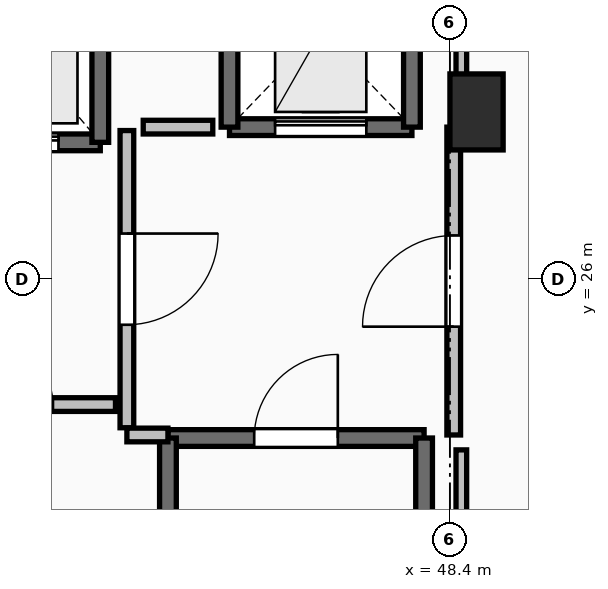
"""IFC4 building model, lengths in metres.
Left out: names, types, materials, properties, quantities, classifications, styles, units other than length and angle.
Written with IfcOpenShell. Run it as: python <this file> out.ifc"""

import sys

from ifc_helpers import new_model, si_unit, direction, frame, frame_2d, origin, origin_2d, place, context, subcontext, project, spatial, rectangle, extrude, element, fill, save


model = new_model("IFC4")
c1 = context("Model", 3, precision=1e-05, world=origin(), true_north=direction((0.0, 1.0)))
c2 = subcontext(c1, "Body", "Model", "MODEL_VIEW")
j1 = project(units=[si_unit("LENGTHUNIT", "METRE"), si_unit("PLANEANGLEUNIT", "RADIAN")], contexts=[c1])
p1 = place(None, origin())
s1 = spatial("IfcSite", under=j1, at=p1, CompositionType="ELEMENT")
p2 = place(p1, origin())
s2 = spatial("IfcBuilding", under=s1, at=p2, CompositionType="ELEMENT")
p3 = place(p2, frame((0.0, 0.0, 234.25)))
s3 = spatial("IfcBuildingStorey", under=s2, at=p3, CompositionType="ELEMENT", Elevation=234.25)
p4 = place(p3, frame((48.75, 28.2, 0.0), z_axis=(0.0, 0.0, 1.0), x_axis=(1.0, 0.0, 0.0)))
e1 = element("IfcColumn", 1, at=p4, inside=s3, PredefinedType="PILASTER", context=c2, shape_type="SweptSolid", body=[
    extrude(rectangle(XDim=0.7, YDim=1.0, at=origin_2d()), origin(), (0.0, 0.0, 1.0), 3.55),
])
p5 = place(p3, frame((44.69, 23.91, 0.0), z_axis=(0.0, 0.0, 1.0), x_axis=(1.0, 0.0, 0.0)))
e2 = element("IfcWall", 2, at=p5, inside=s3, PredefinedType="SOLIDWALL", context=c2, shape_type="SweptSolid", body=[
    extrude(rectangle(XDim=3.37, YDim=0.22, at=frame_2d((1.685, 0.0))), origin(), (0.0, 0.0, 1.0), 3.29),
])
p6 = place(p5, frame((1.135, 0.0, 0.0)))
e3 = element("IfcOpeningElement", 3, at=p6, cuts=e2, PredefinedType="OPENING", context=c2, shape_type="SweptSolid", body=[
    extrude(rectangle(XDim=1.1, YDim=2.15, at=frame_2d((0.55, 1.075))), frame((0.0, 0.125, 0.0), z_axis=(0.0, -1.0, 0.0), x_axis=(1.0, 0.0, 0.0)), (0.0, 0.0, 1.0), 0.25),
])
for number, where, z_axis, x_axis in (
    (4, (48.06, 23.91, 0.0), (0.0, 0.0, 1.0), (0.0, -1.0, 0.0)),
    (5, (44.69, 16.49, 0.0), (0.0, 0.0, 1.0), (0.0, 1.0, 0.0)),
):
    element("IfcWall", number, at=place(p3, frame(where, z_axis=z_axis, x_axis=x_axis)), inside=s3, PredefinedType="SOLIDWALL", context=c2, shape_type="SweptSolid", body=[
        extrude(rectangle(XDim=7.42, YDim=0.22, at=frame_2d((3.71, 0.0))), origin(), (0.0, 0.0, 1.0), 3.29),
    ])
p7 = place(p3, frame((41.6, 27.8, 0.0), z_axis=(0.0, 0.0, 1.0), x_axis=(1.0, 0.0, 0.0)))
e6 = element("IfcWall", 6, at=p7, inside=s3, PredefinedType="SOLIDWALL", context=c2, shape_type="SweptSolid", body=[
    extrude(rectangle(XDim=2.2, YDim=0.22, at=frame_2d((1.1, 0.0))), origin(), (0.0, 0.0, 1.0), 3.29),
])
p8 = place(p7, frame((0.55, 0.0, 0.0)))
e7 = element("IfcOpeningElement", 7, at=p8, cuts=e6, PredefinedType="OPENING", context=c2, shape_type="SweptSolid", body=[
    extrude(rectangle(XDim=1.1, YDim=2.2, at=frame_2d((0.55, 1.1))), frame((0.0, 0.125, 0.0), z_axis=(0.0, -1.0, 0.0), x_axis=(1.0, 0.0, 0.0)), (0.0, 0.0, 1.0), 0.25),
])
p9 = place(p3, frame((43.8, 27.8, 0.0), z_axis=(0.0, 0.0, 1.0), x_axis=(0.0, 1.0, 0.0)))
e8 = element("IfcWall", 8, at=p9, inside=s3, PredefinedType="SOLIDWALL", context=c2, shape_type="SweptSolid", body=[
    extrude(rectangle(XDim=2.6, YDim=0.22, at=frame_2d((1.3, 0.0))), origin(), (0.0, 0.0, 1.0), 3.29),
])
p10 = place(p3, frame((45.5, 28.0, 0.0), z_axis=(0.0, 0.0, 1.0), x_axis=(1.0, 0.0, 0.0)))
e9 = element("IfcWall", 9, at=p10, inside=s3, PredefinedType="SHEAR", context=c2, shape_type="SweptSolid", body=[
    extrude(rectangle(XDim=2.4, YDim=0.22, at=frame_2d((1.2, 0.0))), origin(), (0.0, 0.0, 1.0), 3.29),
])
p11 = place(p10, frame((0.6, 0.0, 0.0)))
e10 = element("IfcOpeningElement", 10, at=p11, cuts=e9, PredefinedType="OPENING", context=c2, shape_type="SweptSolid", body=[
    extrude(rectangle(XDim=1.2, YDim=2.2, at=frame_2d((0.6, 1.1))), frame((0.0, 0.125, 0.0), z_axis=(0.0, -1.0, 0.0), x_axis=(1.0, 0.0, 0.0)), (0.0, 0.0, 1.0), 0.25),
])
for number, where, z_axis, x_axis in (
    (11, (47.9, 28.0, 0.0), (0.0, 0.0, 1.0), (0.0, 1.0, 0.0)),
    (12, (45.5, 30.5, 0.0), (0.0, 0.0, 1.0), (0.0, -1.0, 0.0)),
):
    element("IfcWall", number, at=place(p3, frame(where, z_axis=z_axis, x_axis=x_axis)), inside=s3, PredefinedType="SHEAR", context=c2, shape_type="SweptSolid", body=[
        extrude(rectangle(XDim=2.5, YDim=0.22, at=frame_2d((1.25, 0.0))), origin(), (0.0, 0.0, 1.0), 3.29),
    ])
p12 = place(p3, frame((44.15, 27.955, 0.0), z_axis=(0.0, 0.0, 1.0), x_axis=(0.0, -1.0, 0.0)))
e13 = element("IfcWall", 13, at=p12, inside=s3, PredefinedType="PARTITIONING", context=c2, shape_type="SweptSolid", body=[
    extrude(rectangle(XDim=3.91, YDim=0.18, at=frame_2d((1.955, 0.0))), origin(), (0.0, 0.0, 1.0), 3.29),
])
p13 = place(p12, frame((1.355, 0.0, 0.0)))
e14 = element("IfcOpeningElement", 14, at=p13, cuts=e13, PredefinedType="OPENING", context=c2, shape_type="SweptSolid", body=[
    extrude(rectangle(XDim=1.2, YDim=2.15, at=frame_2d((0.6, 1.075))), frame((0.0, 0.105, 0.0), z_axis=(0.0, -1.0, 0.0), x_axis=(1.0, 0.0, 0.0)), (0.0, 0.0, 1.0), 0.21),
])
p14 = place(p3, frame((44.15, 23.95, 0.0), z_axis=(0.0, 0.0, 1.0), x_axis=(1.0, 0.0, 0.0)))
e15 = element("IfcWall", 15, at=p14, inside=s3, PredefinedType="PARTITIONING", context=c2, shape_type="SweptSolid", body=[
    extrude(rectangle(XDim=0.54, YDim=0.18, at=frame_2d((0.27, 0.0))), origin(), (0.0, 0.0, 1.0), 3.29),
])
p15 = place(p3, frame((48.45, 23.95, 0.0), z_axis=(0.0, 0.0, 1.0), x_axis=(0.0, 1.0, 0.0)))
e16 = element("IfcWall", 16, at=p15, inside=s3, PredefinedType="PARTITIONING", context=c2, shape_type="SweptSolid", body=[
    extrude(rectangle(XDim=4.05, YDim=0.18, at=frame_2d((2.025, 0.0))), origin(), (0.0, 0.0, 1.0), 3.29),
])
p16 = place(p15, frame((1.425, 0.0, 0.0)))
e17 = element("IfcOpeningElement", 17, at=p16, cuts=e16, PredefinedType="OPENING", context=c2, shape_type="SweptSolid", body=[
    extrude(rectangle(XDim=1.2, YDim=2.15, at=frame_2d((0.6, 1.075))), frame((0.0, 0.105, 0.0), z_axis=(0.0, -1.0, 0.0), x_axis=(1.0, 0.0, 0.0)), (0.0, 0.0, 1.0), 0.21),
])
p17 = place(p3, frame((41.555, 24.35, 0.0), z_axis=(0.0, 0.0, 1.0), x_axis=(1.0, 0.0, 0.0)))
e18 = element("IfcWall", 18, at=p17, inside=s3, PredefinedType="PARTITIONING", context=c2, shape_type="SweptSolid", body=[
    extrude(rectangle(XDim=2.445, YDim=0.18, at=frame_2d((1.223, 0.0))), origin(), (0.0, 0.0, 1.0), 3.29),
])
p18 = place(p17, frame((0.823, 0.0, 0.0)))
e19 = element("IfcOpeningElement", 19, at=p18, cuts=e18, PredefinedType="OPENING", context=c2, shape_type="SweptSolid", body=[
    extrude(rectangle(XDim=0.8, YDim=2.05, at=frame_2d((0.4, 1.025))), frame((0.0, 0.105, 0.0), z_axis=(0.0, -1.0, 0.0), x_axis=(1.0, 0.0, 0.0)), (0.0, 0.0, 1.0), 0.21),
])
p19 = place(p3, frame((45.28, 28.0, 0.0), z_axis=(0.0, 0.0, 1.0), x_axis=(-1.0, 0.0, 0.0)))
e20 = element("IfcWall", 20, at=p19, inside=s3, PredefinedType="PARTITIONING", context=c2, shape_type="SweptSolid", body=[
    extrude(rectangle(XDim=0.915, YDim=0.18, at=frame_2d((0.458, 0.0))), origin(), (0.0, 0.0, 1.0), 3.29),
])
p20 = place(p3, frame((48.55, 16.24, 0.0), z_axis=(0.0, 0.0, 1.0), x_axis=(0.0, 1.0, 0.0)))
e21 = element("IfcWall", 21, at=p20, inside=s3, PredefinedType="PARTITIONING", context=c2, shape_type="SweptSolid", body=[
    extrude(rectangle(XDim=7.514, YDim=0.14, at=frame_2d((3.757, 0.0))), origin(), (0.0, 0.0, 1.0), 2.482),
])
p21 = place(p3, frame((48.55, 28.196, 0.0), z_axis=(0.0, 0.0, 1.0), x_axis=(0.0, 1.0, 0.0)))
e22 = element("IfcWall", 22, at=p21, inside=s3, PredefinedType="PARTITIONING", context=c2, shape_type="SweptSolid", body=[
    extrude(rectangle(XDim=5.254, YDim=0.14, at=frame_2d((2.627, 0.0))), origin(), (0.0, 0.0, 1.0), 2.482),
])
p22 = place(p6, origin())
e23 = element("IfcDoor", 23, at=p22, inside=s3, OperationType="SINGLE_SWING_RIGHT", PredefinedType="DOOR", context=c2, shape_type="SweptSolid", body=[
    extrude(rectangle(XDim=1.1, YDim=2.15, at=frame_2d((0.55, 1.075))), frame((0.0, 0.025, 0.0), z_axis=(0.0, -1.0, 0.0), x_axis=(1.0, 0.0, 0.0)), (0.0, 0.0, 1.0), 0.05),
])
fill(e3, e23)
p23 = place(p8, origin())
e24 = element("IfcDoor", 24, at=p23, inside=s3, OperationType="SLIDING_TO_LEFT", PredefinedType="DOOR", context=c2, shape_type="SweptSolid", body=[
    extrude(rectangle(XDim=1.1, YDim=2.2, at=frame_2d((0.55, 1.1))), frame((0.0, 0.025, 0.0), z_axis=(0.0, -1.0, 0.0), x_axis=(1.0, 0.0, 0.0)), (0.0, 0.0, 1.0), 0.05),
])
fill(e7, e24)
p24 = place(p11, origin())
e25 = element("IfcDoor", 25, at=p24, inside=s3, OperationType="SLIDING_TO_LEFT", PredefinedType="DOOR", context=c2, shape_type="SweptSolid", body=[
    extrude(rectangle(XDim=1.2, YDim=2.2, at=frame_2d((0.6, 1.1))), frame((0.0, 0.025, 0.0), z_axis=(0.0, -1.0, 0.0), x_axis=(1.0, 0.0, 0.0)), (0.0, 0.0, 1.0), 0.05),
])
fill(e10, e25)
p25 = place(p13, origin())
e26 = element("IfcDoor", 26, at=p25, inside=s3, OperationType="SINGLE_SWING_LEFT", PredefinedType="DOOR", context=c2, shape_type="SweptSolid", body=[
    extrude(rectangle(XDim=1.2, YDim=2.15, at=frame_2d((0.6, 1.075))), frame((0.0, 0.025, 0.0), z_axis=(0.0, -1.0, 0.0), x_axis=(1.0, 0.0, 0.0)), (0.0, 0.0, 1.0), 0.05),
])
fill(e14, e26)
p26 = place(p16, origin())
e27 = element("IfcDoor", 27, at=p26, inside=s3, OperationType="SINGLE_SWING_LEFT", PredefinedType="DOOR", context=c2, shape_type="SweptSolid", body=[
    extrude(rectangle(XDim=1.2, YDim=2.15, at=frame_2d((0.6, 1.075))), frame((0.0, 0.025, 0.0), z_axis=(0.0, -1.0, 0.0), x_axis=(1.0, 0.0, 0.0)), (0.0, 0.0, 1.0), 0.05),
])
fill(e17, e27)
p27 = place(p18, origin())
e28 = element("IfcDoor", 28, at=p27, inside=s3, OperationType="SINGLE_SWING_LEFT", PredefinedType="DOOR", context=c2, shape_type="SweptSolid", body=[
    extrude(rectangle(XDim=0.8, YDim=2.05, at=frame_2d((0.4, 1.025))), frame((0.0, 0.025, 0.0), z_axis=(0.0, -1.0, 0.0), x_axis=(1.0, 0.0, 0.0)), (0.0, 0.0, 1.0), 0.05),
])
fill(e19, e28)
save(model, sys.argv[1])
